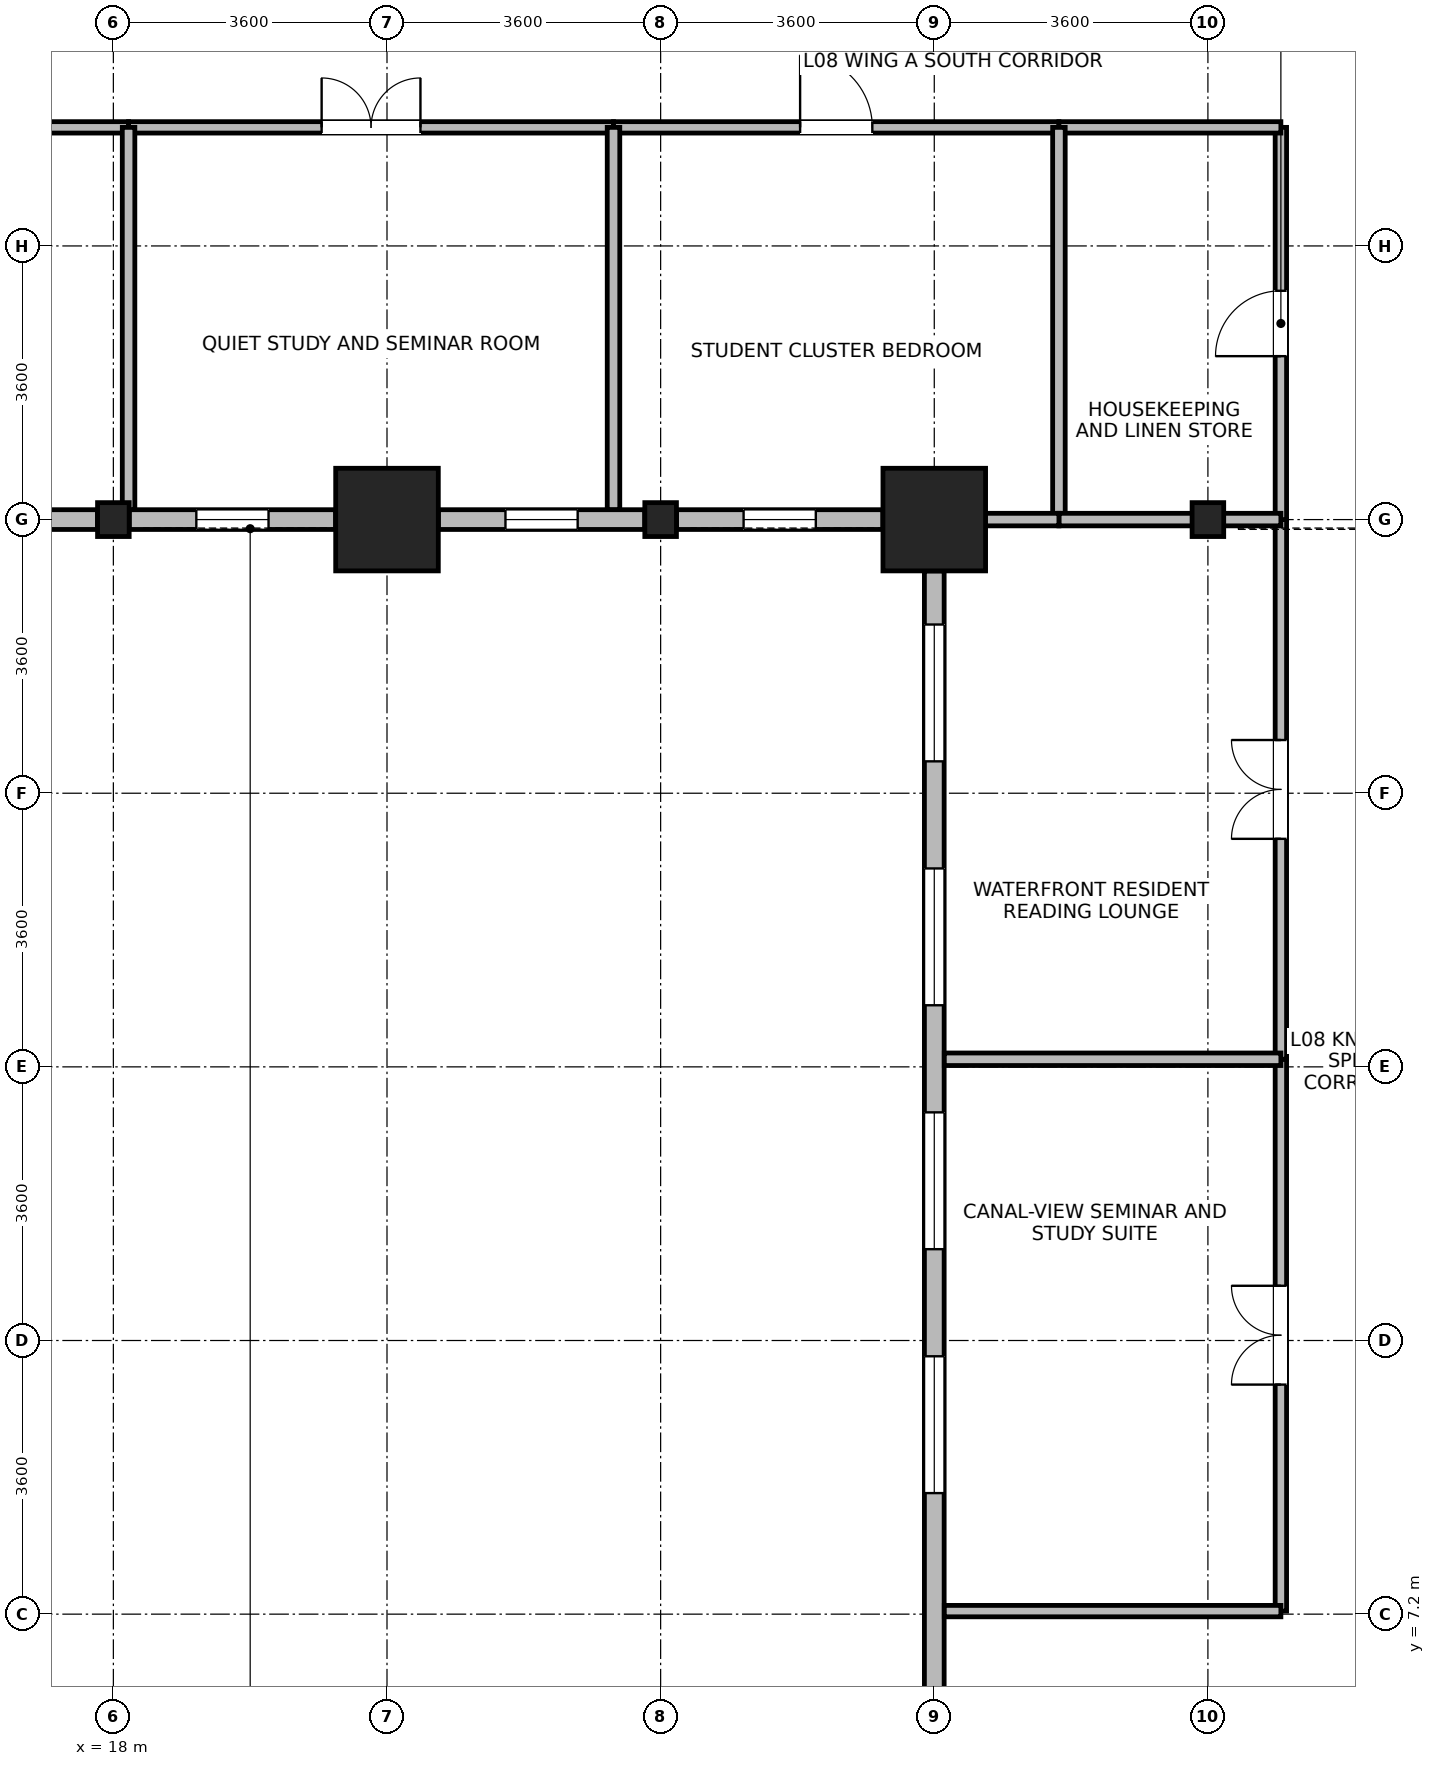
"""IFC4 building model, lengths in metres.
Left out: names, types, materials, properties, quantities, classifications, styles, units other than length and angle.
Written with IfcOpenShell. Run it as: python <this file> out.ifc"""

import sys

from ifc_helpers import new_model, si_unit, direction, frame, frame_2d, origin, origin_2d, place, context, subcontext, project, spatial, rectangle, i_section, extrude, source, transform, mapped, element, fill, save


model = new_model("IFC4")
c1 = context("Model", 3, precision=1e-05, world=origin(), true_north=direction((0.0, 1.0)))
c2 = subcontext(c1, "Body", "Model", "MODEL_VIEW")
j1 = project(units=[si_unit("LENGTHUNIT", "METRE"), si_unit("PLANEANGLEUNIT", "RADIAN")], contexts=[c1])
p1 = place(None, origin())
s1 = spatial("IfcSite", under=j1, at=p1, CompositionType="ELEMENT")
p2 = place(p1, origin())
s2 = spatial("IfcBuilding", under=s1, at=p2, CompositionType="ELEMENT")
p3 = place(p2, frame((0.0, 0.0, 36.4)))
s3 = spatial("IfcBuildingStorey", under=s2, at=p3, CompositionType="ELEMENT", Elevation=36.4)
m1 = source(origin(), c2, "Body", "SweptSolid", [
    extrude(rectangle(XDim=1.35, YDim=1.35, at=origin_2d()), origin(), (0.0, 0.0, 1.0), 3.7),
])
for number, where, z_axis, x_axis in (
    (1, (21.6, 21.6, 0.0), (0.0, 0.0, 1.0), (1.0, 0.0, 0.0)),
    (2, (28.8, 21.6, 0.0), (0.0, 0.0, 1.0), (1.0, 0.0, 0.0)),
):
    element("IfcColumn", number, at=place(p3, frame(where, z_axis=z_axis, x_axis=x_axis)), inside=s3, PredefinedType="COLUMN", context=c2, shape_type="MappedRepresentation", body=[
        mapped(m1, transform((0.0, 0.0, 0.0), x_axis=(1.0, 0.0, 0.0), y_axis=(0.0, 1.0, 0.0), z_axis=(0.0, 0.0, 1.0), scale=1.0)),
    ])
m2 = source(origin(), c2, "Body", "SweptSolid", [
    extrude(i_section(OverallWidth=0.416, OverallDepth=0.446, WebThickness=0.029, FlangeThickness=0.04, FilletRadius=0.015, at=origin_2d()), origin(), (0.0, 0.0, 1.0), 3.7),
])
for number, where, z_axis, x_axis in (
    (3, (18.0, 21.6, 0.0), (0.0, 0.0, 1.0), (1.0, 0.0, 0.0)),
    (4, (25.2, 21.6, 0.0), (0.0, 0.0, 1.0), (1.0, 0.0, 0.0)),
    (5, (32.4, 21.6, 0.0), (0.0, 0.0, 1.0), (1.0, 0.0, 0.0)),
):
    element("IfcColumn", number, at=place(p3, frame(where, z_axis=z_axis, x_axis=x_axis)), inside=s3, PredefinedType="COLUMN", context=c2, shape_type="MappedRepresentation", body=[
        mapped(m2, transform((0.0, 0.0, 0.0), x_axis=(1.0, 0.0, 0.0), y_axis=(0.0, 1.0, 0.0), z_axis=(0.0, 0.0, 1.0), scale=1.0)),
    ])
p4 = place(p3, frame((17.791, 21.6, 0.0), z_axis=(0.0, 0.0, 1.0), x_axis=(-1.0, 0.0, 0.0)))
e6 = element("IfcWall", 6, at=p4, inside=s3, PredefinedType="STANDARD", context=c2, shape_type="SweptSolid", body=[
    extrude(rectangle(XDim=2.715, YDim=0.26, at=frame_2d((1.357, 0.0))), origin(), (0.0, 0.0, 1.0), 2.93),
])
p5 = place(p4, frame((0.883, 0.0, 0.85)))
e7 = element("IfcOpeningElement", 7, at=p5, cuts=e6, PredefinedType="OPENING", context=c2, shape_type="SweptSolid", body=[
    extrude(rectangle(XDim=0.95, YDim=1.75, at=frame_2d((0.475, 0.875))), frame((0.0, 0.14, 0.0), z_axis=(0.0, -1.0, 0.0), x_axis=(1.0, 0.0, 0.0)), (0.0, 0.0, 1.0), 0.28),
])
p6 = place(p3, frame((20.924, 21.6, 0.0), z_axis=(0.0, 0.0, 1.0), x_axis=(-1.0, 0.0, 0.0)))
e8 = element("IfcWall", 8, at=p6, inside=s3, PredefinedType="STANDARD", context=c2, shape_type="SweptSolid", body=[
    extrude(rectangle(XDim=2.715, YDim=0.26, at=frame_2d((1.357, 0.0))), origin(), (0.0, 0.0, 1.0), 2.93),
])
p7 = place(p6, frame((0.883, 0.0, 0.85)))
e9 = element("IfcOpeningElement", 9, at=p7, cuts=e8, PredefinedType="OPENING", context=c2, shape_type="SweptSolid", body=[
    extrude(rectangle(XDim=0.95, YDim=1.75, at=frame_2d((0.475, 0.875))), frame((0.0, 0.14, 0.0), z_axis=(0.0, -1.0, 0.0), x_axis=(1.0, 0.0, 0.0)), (0.0, 0.0, 1.0), 0.28),
])
p8 = place(p3, frame((24.991, 21.6, 0.0), z_axis=(0.0, 0.0, 1.0), x_axis=(-1.0, 0.0, 0.0)))
e10 = element("IfcWall", 10, at=p8, inside=s3, PredefinedType="STANDARD", context=c2, shape_type="SweptSolid", body=[
    extrude(rectangle(XDim=2.715, YDim=0.26, at=frame_2d((1.357, 0.0))), origin(), (0.0, 0.0, 1.0), 2.93),
])
p9 = place(p8, frame((0.883, 0.0, 0.85)))
e11 = element("IfcOpeningElement", 11, at=p9, cuts=e10, PredefinedType="OPENING", context=c2, shape_type="SweptSolid", body=[
    extrude(rectangle(XDim=0.95, YDim=1.75, at=frame_2d((0.475, 0.875))), frame((0.0, 0.14, 0.0), z_axis=(0.0, -1.0, 0.0), x_axis=(1.0, 0.0, 0.0)), (0.0, 0.0, 1.0), 0.28),
])
p10 = place(p3, frame((28.124, 21.6, 0.0), z_axis=(0.0, 0.0, 1.0), x_axis=(-1.0, 0.0, 0.0)))
e12 = element("IfcWall", 12, at=p10, inside=s3, PredefinedType="STANDARD", context=c2, shape_type="SweptSolid", body=[
    extrude(rectangle(XDim=2.715, YDim=0.26, at=frame_2d((1.357, 0.0))), origin(), (0.0, 0.0, 1.0), 2.93),
])
p11 = place(p10, frame((0.883, 0.0, 0.85)))
e13 = element("IfcOpeningElement", 13, at=p11, cuts=e12, PredefinedType="OPENING", context=c2, shape_type="SweptSolid", body=[
    extrude(rectangle(XDim=0.95, YDim=1.75, at=frame_2d((0.475, 0.875))), frame((0.0, 0.14, 0.0), z_axis=(0.0, -1.0, 0.0), x_axis=(1.0, 0.0, 0.0)), (0.0, 0.0, 1.0), 0.28),
])
p12 = place(p3, frame((28.8, 1.67, 0.0), z_axis=(0.0, 0.0, 1.0), x_axis=(0.0, 1.0, 0.0)))
e14 = element("IfcWall", 14, at=p12, inside=s3, PredefinedType="STANDARD", context=c2, shape_type="SweptSolid", body=[
    extrude(rectangle(XDim=19.254, YDim=0.26, at=frame_2d((9.627, 0.0))), origin(), (0.0, 0.0, 1.0), 3.43),
])
p13 = place(p12, frame((0.705, 0.0, 0.85)))
e15 = element("IfcOpeningElement", 15, at=p13, cuts=e14, PredefinedType="OPENING", context=c2, shape_type="SweptSolid", body=[
    extrude(rectangle(XDim=1.8, YDim=1.85, at=frame_2d((0.9, 0.925))), frame((0.0, 0.14, 0.0), z_axis=(0.0, -1.0, 0.0), x_axis=(1.0, 0.0, 0.0)), (0.0, 0.0, 1.0), 0.28),
])
p14 = place(p12, frame((7.123, 0.0, 0.85)))
e16 = element("IfcOpeningElement", 16, at=p14, cuts=e14, PredefinedType="OPENING", context=c2, shape_type="SweptSolid", body=[
    extrude(rectangle(XDim=1.8, YDim=1.85, at=frame_2d((0.9, 0.925))), frame((0.0, 0.14, 0.0), z_axis=(0.0, -1.0, 0.0), x_axis=(1.0, 0.0, 0.0)), (0.0, 0.0, 1.0), 0.28),
])
p15 = place(p12, frame((10.332, 0.0, 0.85)))
e17 = element("IfcOpeningElement", 17, at=p15, cuts=e14, PredefinedType="OPENING", context=c2, shape_type="SweptSolid", body=[
    extrude(rectangle(XDim=1.8, YDim=1.85, at=frame_2d((0.9, 0.925))), frame((0.0, 0.14, 0.0), z_axis=(0.0, -1.0, 0.0), x_axis=(1.0, 0.0, 0.0)), (0.0, 0.0, 1.0), 0.28),
])
p16 = place(p12, frame((13.541, 0.0, 0.85)))
e18 = element("IfcOpeningElement", 18, at=p16, cuts=e14, PredefinedType="OPENING", context=c2, shape_type="SweptSolid", body=[
    extrude(rectangle(XDim=1.8, YDim=1.85, at=frame_2d((0.9, 0.925))), frame((0.0, 0.14, 0.0), z_axis=(0.0, -1.0, 0.0), x_axis=(1.0, 0.0, 0.0)), (0.0, 0.0, 1.0), 0.28),
])
p17 = place(p12, frame((16.75, 0.0, 0.85)))
e19 = element("IfcOpeningElement", 19, at=p17, cuts=e14, PredefinedType="OPENING", context=c2, shape_type="SweptSolid", body=[
    extrude(rectangle(XDim=1.8, YDim=1.85, at=frame_2d((0.9, 0.925))), frame((0.0, 0.14, 0.0), z_axis=(0.0, -1.0, 0.0), x_axis=(1.0, 0.0, 0.0)), (0.0, 0.0, 1.0), 0.28),
])
p18 = place(p3, frame((10.24, 26.76, 0.0), z_axis=(0.0, 0.0, 1.0), x_axis=(1.0, 0.0, 0.0)))
e20 = element("IfcWall", 20, at=p18, inside=s3, PredefinedType="PARTITIONING", context=c2, shape_type="SweptSolid", body=[
    extrude(rectangle(XDim=7.96, YDim=0.15, at=frame_2d((3.98, 0.0))), origin(), (0.0, 0.0, 1.0), 3.43),
])
p19 = place(p18, frame((2.072, 0.0, 0.0)))
e21 = element("IfcOpeningElement", 21, at=p19, cuts=e20, PredefinedType="OPENING", context=c2, shape_type="SweptSolid", body=[
    extrude(rectangle(XDim=0.95, YDim=2.1, at=frame_2d((0.475, 1.05))), frame((0.0, 0.085, 0.0), z_axis=(0.0, -1.0, 0.0), x_axis=(1.0, 0.0, 0.0)), (0.0, 0.0, 1.0), 0.17),
])
p20 = place(p3, frame((33.36, 7.24, 0.0), z_axis=(0.0, 0.0, 1.0), x_axis=(0.0, 1.0, 0.0)))
e22 = element("IfcWall", 22, at=p20, inside=s3, PredefinedType="PARTITIONING", context=c2, shape_type="SweptSolid", body=[
    extrude(rectangle(XDim=7.26, YDim=0.15, at=frame_2d((3.63, 0.0))), origin(), (0.0, 0.0, 1.0), 3.43),
])
p21 = place(p20, frame((2.98, 0.0, 0.0)))
e23 = element("IfcOpeningElement", 23, at=p21, cuts=e22, PredefinedType="OPENING", context=c2, shape_type="SweptSolid", body=[
    extrude(rectangle(XDim=1.3, YDim=2.12, at=frame_2d((0.65, 1.06))), frame((0.0, 0.085, 0.0), z_axis=(0.0, -1.0, 0.0), x_axis=(1.0, 0.0, 0.0)), (0.0, 0.0, 1.0), 0.17),
])
p22 = place(p3, frame((33.36, 14.5, 0.0), z_axis=(0.0, 0.0, 1.0), x_axis=(0.0, 1.0, 0.0)))
e24 = element("IfcWall", 24, at=p22, inside=s3, PredefinedType="PARTITIONING", context=c2, shape_type="SweptSolid", body=[
    extrude(rectangle(XDim=7.1, YDim=0.15, at=frame_2d((3.55, 0.0))), origin(), (0.0, 0.0, 1.0), 3.43),
])
p23 = place(p22, frame((2.9, 0.0, 0.0)))
e25 = element("IfcOpeningElement", 25, at=p23, cuts=e24, PredefinedType="OPENING", context=c2, shape_type="SweptSolid", body=[
    extrude(rectangle(XDim=1.3, YDim=2.12, at=frame_2d((0.65, 1.06))), frame((0.0, 0.085, 0.0), z_axis=(0.0, -1.0, 0.0), x_axis=(1.0, 0.0, 0.0)), (0.0, 0.0, 1.0), 0.17),
])
p24 = place(p3, frame((18.2, 26.76, 0.0), z_axis=(0.0, 0.0, 1.0), x_axis=(1.0, 0.0, 0.0)))
e26 = element("IfcWall", 26, at=p24, inside=s3, PredefinedType="PARTITIONING", context=c2, shape_type="SweptSolid", body=[
    extrude(rectangle(XDim=6.38, YDim=0.15, at=frame_2d((3.19, 0.0))), origin(), (0.0, 0.0, 1.0), 3.43),
])
p25 = place(p24, frame((2.54, 0.0, 0.0)))
e27 = element("IfcOpeningElement", 27, at=p25, cuts=e26, PredefinedType="OPENING", context=c2, shape_type="SweptSolid", body=[
    extrude(rectangle(XDim=1.3, YDim=2.12, at=frame_2d((0.65, 1.06))), frame((0.0, 0.085, 0.0), z_axis=(0.0, -1.0, 0.0), x_axis=(1.0, 0.0, 0.0)), (0.0, 0.0, 1.0), 0.17),
])
p26 = place(p3, frame((24.58, 26.76, 0.0), z_axis=(0.0, 0.0, 1.0), x_axis=(1.0, 0.0, 0.0)))
e28 = element("IfcWall", 28, at=p26, inside=s3, PredefinedType="PARTITIONING", context=c2, shape_type="SweptSolid", body=[
    extrude(rectangle(XDim=5.86, YDim=0.15, at=frame_2d((2.93, 0.0))), origin(), (0.0, 0.0, 1.0), 3.43),
])
p27 = place(p26, frame((2.455, 0.0, 0.0)))
e29 = element("IfcOpeningElement", 29, at=p27, cuts=e28, PredefinedType="OPENING", context=c2, shape_type="SweptSolid", body=[
    extrude(rectangle(XDim=0.95, YDim=2.1, at=frame_2d((0.475, 1.05))), frame((0.0, 0.085, 0.0), z_axis=(0.0, -1.0, 0.0), x_axis=(1.0, 0.0, 0.0)), (0.0, 0.0, 1.0), 0.17),
])
p28 = place(p3, frame((33.36, 21.6, 0.0), z_axis=(0.0, 0.0, 1.0), x_axis=(0.0, 1.0, 0.0)))
e30 = element("IfcWall", 30, at=p28, inside=s3, PredefinedType="PARTITIONING", context=c2, shape_type="SweptSolid", body=[
    extrude(rectangle(XDim=5.16, YDim=0.15, at=frame_2d((2.58, 0.0))), origin(), (0.0, 0.0, 1.0), 3.43),
])
p29 = place(p28, frame((2.15, 0.0, 0.0)))
e31 = element("IfcOpeningElement", 31, at=p29, cuts=e30, PredefinedType="OPENING", context=c2, shape_type="SweptSolid", body=[
    extrude(rectangle(XDim=0.86, YDim=2.02, at=frame_2d((0.43, 1.01))), frame((0.0, 0.085, 0.0), z_axis=(0.0, -1.0, 0.0), x_axis=(1.0, 0.0, 0.0)), (0.0, 0.0, 1.0), 0.17),
])
p30 = place(p3, frame((28.932, 7.24, 0.0), z_axis=(0.0, 0.0, 1.0), x_axis=(1.0, 0.0, 0.0)))
e32 = element("IfcWall", 32, at=p30, inside=s3, PredefinedType="PARTITIONING", context=c2, shape_type="SweptSolid", body=[
    extrude(rectangle(XDim=4.428, YDim=0.15, at=frame_2d((2.214, 0.0))), origin(), (0.0, 0.0, 1.0), 3.43),
])
p31 = place(p3, frame((30.44, 26.76, 0.0), z_axis=(0.0, 0.0, 1.0), x_axis=(1.0, 0.0, 0.0)))
e33 = element("IfcWall", 33, at=p31, inside=s3, PredefinedType="PARTITIONING", context=c2, shape_type="SweptSolid", body=[
    extrude(rectangle(XDim=2.92, YDim=0.15, at=frame_2d((1.46, 0.0))), origin(), (0.0, 0.0, 1.0), 3.43),
])
p32 = place(p3, frame((18.2, 21.732, 0.0), z_axis=(0.0, 0.0, 1.0), x_axis=(0.0, 1.0, 0.0)))
e34 = element("IfcWall", 34, at=p32, inside=s3, PredefinedType="PARTITIONING", context=c2, shape_type="SweptSolid", body=[
    extrude(rectangle(XDim=5.028, YDim=0.165, at=frame_2d((2.514, 0.0))), origin(), (0.0, 0.0, 1.0), 3.07),
])
p33 = place(p3, frame((24.58, 21.732, 0.0), z_axis=(0.0, 0.0, 1.0), x_axis=(0.0, 1.0, 0.0)))
e35 = element("IfcWall", 35, at=p33, inside=s3, PredefinedType="PARTITIONING", context=c2, shape_type="SweptSolid", body=[
    extrude(rectangle(XDim=5.028, YDim=0.165, at=frame_2d((2.514, 0.0))), origin(), (0.0, 0.0, 1.0), 3.43),
])
p34 = place(p3, frame((30.44, 21.6, 0.0), z_axis=(0.0, 0.0, 1.0), x_axis=(0.0, 1.0, 0.0)))
e36 = element("IfcWall", 36, at=p34, inside=s3, PredefinedType="PARTITIONING", context=c2, shape_type="SweptSolid", body=[
    extrude(rectangle(XDim=5.16, YDim=0.165, at=frame_2d((2.58, 0.0))), origin(), (0.0, 0.0, 1.0), 3.43),
])
p35 = place(p3, frame((28.932, 14.5, 0.0), z_axis=(0.0, 0.0, 1.0), x_axis=(1.0, 0.0, 0.0)))
e37 = element("IfcWall", 37, at=p35, inside=s3, PredefinedType="PARTITIONING", context=c2, shape_type="SweptSolid", body=[
    extrude(rectangle(XDim=4.428, YDim=0.165, at=frame_2d((2.214, 0.0))), origin(), (0.0, 0.0, 1.0), 3.43),
])
p36 = place(p3, frame((30.44, 21.6, 0.0), z_axis=(0.0, 0.0, 1.0), x_axis=(1.0, 0.0, 0.0)))
e38 = element("IfcWall", 38, at=p36, inside=s3, PredefinedType="PARTITIONING", context=c2, shape_type="SweptSolid", body=[
    extrude(rectangle(XDim=2.92, YDim=0.165, at=frame_2d((1.46, 0.0))), origin(), (0.0, 0.0, 1.0), 2.93),
])
p37 = place(p3, frame((28.932, 21.6, 0.0), z_axis=(0.0, 0.0, 1.0), x_axis=(1.0, 0.0, 0.0)))
e39 = element("IfcWall", 39, at=p37, inside=s3, PredefinedType="PARTITIONING", context=c2, shape_type="SweptSolid", body=[
    extrude(rectangle(XDim=1.508, YDim=0.165, at=frame_2d((0.754, 0.0))), origin(), (0.0, 0.0, 1.0), 2.93),
])
p38 = place(p7, origin())
e40 = element("IfcWindow", 40, at=p38, inside=s3, PartitioningType="SINGLE_PANEL", PredefinedType="WINDOW", context=c2, shape_type="SweptSolid", body=[
    extrude(rectangle(XDim=0.95, YDim=1.75, at=frame_2d((0.475, 0.875))), frame((0.0, 0.03, 0.0), z_axis=(0.0, -1.0, 0.0), x_axis=(1.0, 0.0, 0.0)), (0.0, 0.0, 1.0), 0.06),
])
fill(e9, e40)
p39 = place(p9, origin())
e41 = element("IfcWindow", 41, at=p39, inside=s3, PartitioningType="SINGLE_PANEL", PredefinedType="WINDOW", context=c2, shape_type="SweptSolid", body=[
    extrude(rectangle(XDim=0.95, YDim=1.75, at=frame_2d((0.475, 0.875))), frame((0.0, 0.03, 0.0), z_axis=(0.0, -1.0, 0.0), x_axis=(1.0, 0.0, 0.0)), (0.0, 0.0, 1.0), 0.06),
])
fill(e11, e41)
p40 = place(p11, origin())
e42 = element("IfcWindow", 42, at=p40, inside=s3, PartitioningType="SINGLE_PANEL", PredefinedType="WINDOW", context=c2, shape_type="SweptSolid", body=[
    extrude(rectangle(XDim=0.95, YDim=1.75, at=frame_2d((0.475, 0.875))), frame((0.0, 0.03, 0.0), z_axis=(0.0, -1.0, 0.0), x_axis=(1.0, 0.0, 0.0)), (0.0, 0.0, 1.0), 0.06),
])
fill(e13, e42)
p41 = place(p14, origin())
e43 = element("IfcWindow", 43, at=p41, inside=s3, PartitioningType="SINGLE_PANEL", PredefinedType="WINDOW", context=c2, shape_type="SweptSolid", body=[
    extrude(rectangle(XDim=1.8, YDim=1.85, at=frame_2d((0.9, 0.925))), frame((0.0, 0.03, 0.0), z_axis=(0.0, -1.0, 0.0), x_axis=(1.0, 0.0, 0.0)), (0.0, 0.0, 1.0), 0.06),
])
fill(e16, e43)
p42 = place(p15, origin())
e44 = element("IfcWindow", 44, at=p42, inside=s3, PartitioningType="SINGLE_PANEL", PredefinedType="WINDOW", context=c2, shape_type="SweptSolid", body=[
    extrude(rectangle(XDim=1.8, YDim=1.85, at=frame_2d((0.9, 0.925))), frame((0.0, 0.03, 0.0), z_axis=(0.0, -1.0, 0.0), x_axis=(1.0, 0.0, 0.0)), (0.0, 0.0, 1.0), 0.06),
])
fill(e17, e44)
p43 = place(p16, origin())
e45 = element("IfcWindow", 45, at=p43, inside=s3, PartitioningType="SINGLE_PANEL", PredefinedType="WINDOW", context=c2, shape_type="SweptSolid", body=[
    extrude(rectangle(XDim=1.8, YDim=1.85, at=frame_2d((0.9, 0.925))), frame((0.0, 0.03, 0.0), z_axis=(0.0, -1.0, 0.0), x_axis=(1.0, 0.0, 0.0)), (0.0, 0.0, 1.0), 0.06),
])
fill(e18, e45)
p44 = place(p17, origin())
e46 = element("IfcWindow", 46, at=p44, inside=s3, PartitioningType="SINGLE_PANEL", PredefinedType="WINDOW", context=c2, shape_type="SweptSolid", body=[
    extrude(rectangle(XDim=1.8, YDim=1.85, at=frame_2d((0.9, 0.925))), frame((0.0, 0.03, 0.0), z_axis=(0.0, -1.0, 0.0), x_axis=(1.0, 0.0, 0.0)), (0.0, 0.0, 1.0), 0.06),
])
fill(e19, e46)
p45 = place(p21, origin())
e47 = element("IfcDoor", 47, at=p45, inside=s3, OperationType="DOUBLE_DOOR_SINGLE_SWING", PredefinedType="DOOR", context=c2, shape_type="SweptSolid", body=[
    extrude(rectangle(XDim=1.3, YDim=2.12, at=frame_2d((0.65, 1.06))), frame((0.0, 0.025, 0.0), z_axis=(0.0, -1.0, 0.0), x_axis=(1.0, 0.0, 0.0)), (0.0, 0.0, 1.0), 0.05),
])
fill(e23, e47)
p46 = place(p23, origin())
e48 = element("IfcDoor", 48, at=p46, inside=s3, OperationType="DOUBLE_DOOR_SINGLE_SWING", PredefinedType="DOOR", context=c2, shape_type="SweptSolid", body=[
    extrude(rectangle(XDim=1.3, YDim=2.12, at=frame_2d((0.65, 1.06))), frame((0.0, 0.025, 0.0), z_axis=(0.0, -1.0, 0.0), x_axis=(1.0, 0.0, 0.0)), (0.0, 0.0, 1.0), 0.05),
])
fill(e25, e48)
p47 = place(p25, origin())
e49 = element("IfcDoor", 49, at=p47, inside=s3, OperationType="DOUBLE_DOOR_SINGLE_SWING", PredefinedType="DOOR", context=c2, shape_type="SweptSolid", body=[
    extrude(rectangle(XDim=1.3, YDim=2.12, at=frame_2d((0.65, 1.06))), frame((0.0, 0.025, 0.0), z_axis=(0.0, -1.0, 0.0), x_axis=(1.0, 0.0, 0.0)), (0.0, 0.0, 1.0), 0.05),
])
fill(e27, e49)
p48 = place(p27, origin())
e50 = element("IfcDoor", 50, at=p48, inside=s3, OperationType="SINGLE_SWING_LEFT", PredefinedType="DOOR", context=c2, shape_type="SweptSolid", body=[
    extrude(rectangle(XDim=0.95, YDim=2.1, at=frame_2d((0.475, 1.05))), frame((0.0, 0.025, 0.0), z_axis=(0.0, -1.0, 0.0), x_axis=(1.0, 0.0, 0.0)), (0.0, 0.0, 1.0), 0.05),
])
fill(e29, e50)
p49 = place(p29, origin())
e51 = element("IfcDoor", 51, at=p49, inside=s3, OperationType="SINGLE_SWING_LEFT", PredefinedType="DOOR", context=c2, shape_type="SweptSolid", body=[
    extrude(rectangle(XDim=0.86, YDim=2.02, at=frame_2d((0.43, 1.01))), frame((0.0, 0.025, 0.0), z_axis=(0.0, -1.0, 0.0), x_axis=(1.0, 0.0, 0.0)), (0.0, 0.0, 1.0), 0.05),
])
fill(e31, e51)
save(model, sys.argv[1])
